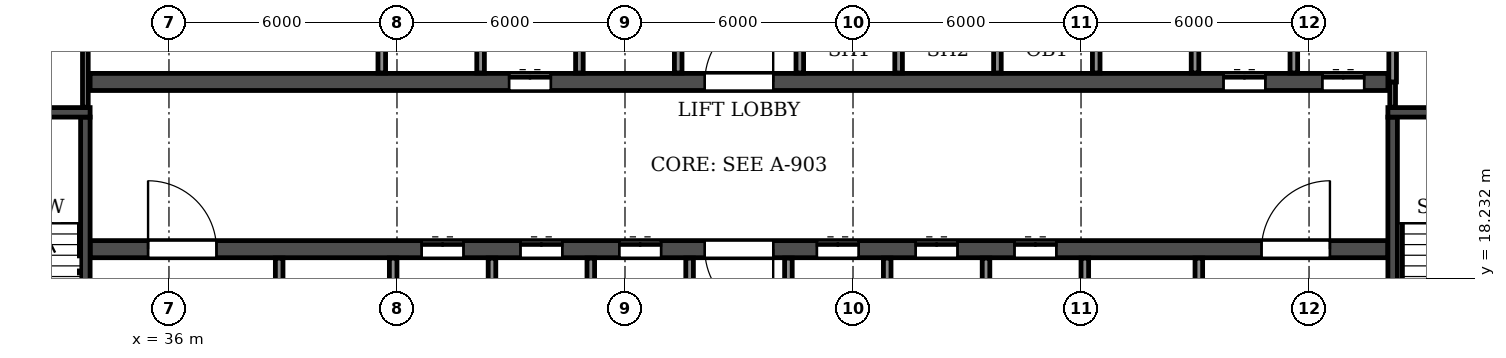
"""IFC4 building model, lengths in metres.
Left out: names, types, materials, properties, quantities, classifications, styles, units other than length and angle.
Written with IfcOpenShell. Run it as: python <this file> out.ifc"""

import sys

from ifc_helpers import new_model, si_unit, direction, frame, frame_2d, origin, place, context, subcontext, project, spatial, rectangle, extrude, element, fill, save


model = new_model("IFC4")
c1 = context("Model", 3, precision=1e-05, world=origin(), true_north=direction((0.0, 1.0)))
c2 = subcontext(c1, "Body", "Model", "MODEL_VIEW")
j1 = project(units=[si_unit("LENGTHUNIT", "METRE"), si_unit("PLANEANGLEUNIT", "RADIAN")], contexts=[c1])
p1 = place(None, origin())
s1 = spatial("IfcSite", under=j1, at=p1, CompositionType="ELEMENT")
p2 = place(p1, origin())
s2 = spatial("IfcBuilding", under=s1, at=p2, CompositionType="ELEMENT")
p3 = place(p2, frame((0.0, 0.0, 10.8)))
s3 = spatial("IfcBuildingStorey", under=s2, at=p3, CompositionType="ELEMENT", Elevation=10.8)
p4 = place(p3, frame((33.925, 19.0, 0.0), z_axis=(0.0, 0.0, 1.0), x_axis=(1.0, 0.0, 0.0)))
e1 = element("IfcWall", 1, at=p4, inside=s3, PredefinedType="SOLIDWALL", context=c2, shape_type="SweptSolid", body=[
    extrude(rectangle(XDim=34.15, YDim=0.45, at=frame_2d((17.075, 0.0))), origin(), (0.0, 0.0, 1.0), 3.92),
])
p5 = place(p4, frame((16.175, 0.0, 0.0)))
e2 = element("IfcOpeningElement", 2, at=p5, cuts=e1, PredefinedType="OPENING", context=c2, shape_type="SweptSolid", body=[
    extrude(rectangle(XDim=1.8, YDim=2.1, at=frame_2d((0.9, 1.05))), frame((0.0, 0.235, 0.0), z_axis=(0.0, -1.0, 0.0), x_axis=(1.0, 0.0, 0.0)), (0.0, 0.0, 1.0), 0.47),
])
p6 = place(p4, frame((1.525, 0.0, 0.0)))
e3 = element("IfcOpeningElement", 3, at=p6, cuts=e1, PredefinedType="OPENING", context=c2, shape_type="SweptSolid", body=[
    extrude(rectangle(XDim=1.8, YDim=2.1, at=frame_2d((0.9, 1.05))), frame((0.0, 0.235, 0.0), z_axis=(0.0, -1.0, 0.0), x_axis=(1.0, 0.0, 0.0)), (0.0, 0.0, 1.0), 0.47),
])
p7 = place(p4, frame((8.725, 0.0, 0.0)))
e4 = element("IfcOpeningElement", 4, at=p7, cuts=e1, PredefinedType="OPENING", context=c2, shape_type="SweptSolid", body=[
    extrude(rectangle(XDim=1.1, YDim=2.1, at=frame_2d((0.55, 1.05))), frame((0.0, 0.235, 0.0), z_axis=(0.0, -1.0, 0.0), x_axis=(1.0, 0.0, 0.0)), (0.0, 0.0, 1.0), 0.47),
])
p8 = place(p4, frame((11.325, 0.0, 0.0)))
e5 = element("IfcOpeningElement", 5, at=p8, cuts=e1, PredefinedType="OPENING", context=c2, shape_type="SweptSolid", body=[
    extrude(rectangle(XDim=1.1, YDim=2.1, at=frame_2d((0.55, 1.05))), frame((0.0, 0.235, 0.0), z_axis=(0.0, -1.0, 0.0), x_axis=(1.0, 0.0, 0.0)), (0.0, 0.0, 1.0), 0.47),
])
p9 = place(p4, frame((13.925, 0.0, 0.0)))
e6 = element("IfcOpeningElement", 6, at=p9, cuts=e1, PredefinedType="OPENING", context=c2, shape_type="SweptSolid", body=[
    extrude(rectangle(XDim=1.1, YDim=2.1, at=frame_2d((0.55, 1.05))), frame((0.0, 0.235, 0.0), z_axis=(0.0, -1.0, 0.0), x_axis=(1.0, 0.0, 0.0)), (0.0, 0.0, 1.0), 0.47),
])
p10 = place(p4, frame((19.125, 0.0, 0.0)))
e7 = element("IfcOpeningElement", 7, at=p10, cuts=e1, PredefinedType="OPENING", context=c2, shape_type="SweptSolid", body=[
    extrude(rectangle(XDim=1.1, YDim=2.1, at=frame_2d((0.55, 1.05))), frame((0.0, 0.235, 0.0), z_axis=(0.0, -1.0, 0.0), x_axis=(1.0, 0.0, 0.0)), (0.0, 0.0, 1.0), 0.47),
])
p11 = place(p4, frame((21.725, 0.0, 0.0)))
e8 = element("IfcOpeningElement", 8, at=p11, cuts=e1, PredefinedType="OPENING", context=c2, shape_type="SweptSolid", body=[
    extrude(rectangle(XDim=1.1, YDim=2.1, at=frame_2d((0.55, 1.05))), frame((0.0, 0.235, 0.0), z_axis=(0.0, -1.0, 0.0), x_axis=(1.0, 0.0, 0.0)), (0.0, 0.0, 1.0), 0.47),
])
p12 = place(p4, frame((24.325, 0.0, 0.0)))
e9 = element("IfcOpeningElement", 9, at=p12, cuts=e1, PredefinedType="OPENING", context=c2, shape_type="SweptSolid", body=[
    extrude(rectangle(XDim=1.1, YDim=2.1, at=frame_2d((0.55, 1.05))), frame((0.0, 0.235, 0.0), z_axis=(0.0, -1.0, 0.0), x_axis=(1.0, 0.0, 0.0)), (0.0, 0.0, 1.0), 0.47),
])
p13 = place(p4, frame((30.825, 0.0, 0.0)))
e10 = element("IfcOpeningElement", 10, at=p13, cuts=e1, PredefinedType="OPENING", context=c2, shape_type="SweptSolid", body=[
    extrude(rectangle(XDim=1.8, YDim=2.1, at=frame_2d((0.9, 1.05))), frame((0.0, 0.235, 0.0), z_axis=(0.0, -1.0, 0.0), x_axis=(1.0, 0.0, 0.0)), (0.0, 0.0, 1.0), 0.47),
])
p14 = place(p3, frame((33.925, 23.4, 0.0), z_axis=(0.0, 0.0, 1.0), x_axis=(1.0, 0.0, 0.0)))
e11 = element("IfcWall", 11, at=p14, inside=s3, PredefinedType="SOLIDWALL", context=c2, shape_type="SweptSolid", body=[
    extrude(rectangle(XDim=34.15, YDim=0.45, at=frame_2d((17.075, 0.0))), origin(), (0.0, 0.0, 1.0), 3.92),
])
p15 = place(p14, frame((16.175, 0.0, 0.0)))
e12 = element("IfcOpeningElement", 12, at=p15, cuts=e11, PredefinedType="OPENING", context=c2, shape_type="SweptSolid", body=[
    extrude(rectangle(XDim=1.8, YDim=2.1, at=frame_2d((0.9, 1.05))), frame((0.0, 0.235, 0.0), z_axis=(0.0, -1.0, 0.0), x_axis=(1.0, 0.0, 0.0)), (0.0, 0.0, 1.0), 0.47),
])
p16 = place(p14, frame((11.025, 0.0, 0.0)))
e13 = element("IfcOpeningElement", 13, at=p16, cuts=e11, PredefinedType="OPENING", context=c2, shape_type="SweptSolid", body=[
    extrude(rectangle(XDim=1.1, YDim=2.1, at=frame_2d((0.55, 1.05))), frame((0.0, 0.235, 0.0), z_axis=(0.0, -1.0, 0.0), x_axis=(1.0, 0.0, 0.0)), (0.0, 0.0, 1.0), 0.47),
])
p17 = place(p14, frame((29.825, 0.0, 0.0)))
e14 = element("IfcOpeningElement", 14, at=p17, cuts=e11, PredefinedType="OPENING", context=c2, shape_type="SweptSolid", body=[
    extrude(rectangle(XDim=1.1, YDim=2.1, at=frame_2d((0.55, 1.05))), frame((0.0, 0.235, 0.0), z_axis=(0.0, -1.0, 0.0), x_axis=(1.0, 0.0, 0.0)), (0.0, 0.0, 1.0), 0.47),
])
p18 = place(p14, frame((32.425, 0.0, 0.0)))
e15 = element("IfcOpeningElement", 15, at=p18, cuts=e11, PredefinedType="OPENING", context=c2, shape_type="SweptSolid", body=[
    extrude(rectangle(XDim=1.1, YDim=2.1, at=frame_2d((0.55, 1.05))), frame((0.0, 0.235, 0.0), z_axis=(0.0, -1.0, 0.0), x_axis=(1.0, 0.0, 0.0)), (0.0, 0.0, 1.0), 0.47),
])
p19 = place(p3, frame((33.8, 14.825, 0.0), z_axis=(0.0, 0.0, 1.0), x_axis=(0.0, 1.0, 0.0)))
e16 = element("IfcWall", 16, at=p19, inside=s3, PredefinedType="SOLIDWALL", context=c2, shape_type="SweptSolid", body=[
    extrude(rectangle(XDim=7.65, YDim=0.25, at=frame_2d((3.825, 0.0))), origin(), (0.0, 0.0, 1.0), 3.92),
])
p20 = place(p19, frame((0.475, 0.0, 0.0)))
e17 = element("IfcOpeningElement", 17, at=p20, cuts=e16, PredefinedType="OPENING", context=c2, shape_type="SweptSolid", body=[
    extrude(rectangle(XDim=1.0, YDim=2.1, at=frame_2d((0.5, 1.05))), frame((0.0, 0.135, 0.0), z_axis=(0.0, -1.0, 0.0), x_axis=(1.0, 0.0, 0.0)), (0.0, 0.0, 1.0), 0.27),
])
p21 = place(p3, frame((29.875, 22.6, 0.0), z_axis=(0.0, 0.0, 1.0), x_axis=(1.0, 0.0, 0.0)))
e18 = element("IfcWall", 18, at=p21, inside=s3, PredefinedType="SOLIDWALL", context=c2, shape_type="SweptSolid", body=[
    extrude(rectangle(XDim=4.05, YDim=0.25, at=frame_2d((2.025, 0.0))), origin(), (0.0, 0.0, 1.0), 3.92),
])
p22 = place(p3, frame((68.2, 14.825, 0.0), z_axis=(0.0, 0.0, 1.0), x_axis=(0.0, 1.0, 0.0)))
e19 = element("IfcWall", 19, at=p22, inside=s3, PredefinedType="SOLIDWALL", context=c2, shape_type="SweptSolid", body=[
    extrude(rectangle(XDim=7.65, YDim=0.25, at=frame_2d((3.825, 0.0))), origin(), (0.0, 0.0, 1.0), 3.92),
])
p23 = place(p22, frame((0.475, 0.0, 0.0)))
e20 = element("IfcOpeningElement", 20, at=p23, cuts=e19, PredefinedType="OPENING", context=c2, shape_type="SweptSolid", body=[
    extrude(rectangle(XDim=1.0, YDim=2.1, at=frame_2d((0.5, 1.05))), frame((0.0, 0.135, 0.0), z_axis=(0.0, -1.0, 0.0), x_axis=(1.0, 0.0, 0.0)), (0.0, 0.0, 1.0), 0.27),
])
p24 = place(p3, frame((68.075, 22.6, 0.0), z_axis=(0.0, 0.0, 1.0), x_axis=(1.0, 0.0, 0.0)))
e21 = element("IfcWall", 21, at=p24, inside=s3, PredefinedType="SOLIDWALL", context=c2, shape_type="SweptSolid", body=[
    extrude(rectangle(XDim=4.05, YDim=0.25, at=frame_2d((2.025, 0.0))), origin(), (0.0, 0.0, 1.0), 3.92),
])
for number, where, z_axis, x_axis in (
    (22, (41.6, 23.635, 0.0), (0.0, 0.0, 1.0), (0.0, 1.0, 0.0)),
    (23, (49.4, 23.635, 0.0), (0.0, 0.0, 1.0), (0.0, 1.0, 0.0)),
):
    element("IfcWall", number, at=place(p3, frame(where, z_axis=z_axis, x_axis=x_axis)), inside=s3, PredefinedType="PARTITIONING", context=c2, shape_type="SweptSolid", body=[
        extrude(rectangle(XDim=3.93, YDim=0.2, at=frame_2d((1.965, 0.0))), origin(), (0.0, 0.0, 1.0), 3.92),
    ])
p25 = place(p3, frame((33.8, 22.735, 0.0), z_axis=(0.0, 0.0, 1.0), x_axis=(0.0, 1.0, 0.0)))
e24 = element("IfcWall", 24, at=p25, inside=s3, PredefinedType="PARTITIONING", context=c2, shape_type="SweptSolid", body=[
    extrude(rectangle(XDim=4.83, YDim=0.15, at=frame_2d((2.415, 0.0))), origin(), (0.0, 0.0, 1.0), 3.92),
])
p26 = place(p3, frame((68.2, 22.735, 0.0), z_axis=(0.0, 0.0, 1.0), x_axis=(0.0, 1.0, 0.0)))
e25 = element("IfcWall", 25, at=p26, inside=s3, PredefinedType="PARTITIONING", context=c2, shape_type="SweptSolid", body=[
    extrude(rectangle(XDim=0.665, YDim=0.15, at=frame_2d((0.333, 0.0))), origin(), (0.0, 0.0, 1.0), 3.92),
])
p27 = place(p3, frame((38.9, 14.835, 0.0), z_axis=(0.0, 0.0, 1.0), x_axis=(0.0, 1.0, 0.0)))
e26 = element("IfcWall", 26, at=p27, inside=s3, PredefinedType="PARTITIONING", context=c2, shape_type="SweptSolid", body=[
    extrude(rectangle(XDim=3.93, YDim=0.2, at=frame_2d((1.965, 0.0))), origin(), (0.0, 0.0, 1.0), 3.92),
])
p28 = place(p27, frame((1.415, 0.0, 0.0)))
e27 = element("IfcOpeningElement", 27, at=p28, cuts=e26, PredefinedType="OPENING", context=c2, shape_type="SweptSolid", body=[
    extrude(rectangle(XDim=1.1, YDim=2.1, at=frame_2d((0.55, 1.05))), frame((0.0, 0.11, 0.0), z_axis=(0.0, -1.0, 0.0), x_axis=(1.0, 0.0, 0.0)), (0.0, 0.0, 1.0), 0.22),
])
for number, where, z_axis, x_axis in (
    (28, (41.9, 14.835, 0.0), (0.0, 0.0, 1.0), (0.0, 1.0, 0.0)),
    (29, (44.2, 23.635, 0.0), (0.0, 0.0, 1.0), (0.0, 1.0, 0.0)),
):
    element("IfcWall", number, at=place(p3, frame(where, z_axis=z_axis, x_axis=x_axis)), inside=s3, PredefinedType="PARTITIONING", context=c2, shape_type="SweptSolid", body=[
        extrude(rectangle(XDim=3.93, YDim=0.2, at=frame_2d((1.965, 0.0))), origin(), (0.0, 0.0, 1.0), 3.92),
    ])
p29 = place(p3, frame((44.5, 16.3, 0.0), z_axis=(0.0, 0.0, 1.0), x_axis=(0.0, 1.0, 0.0)))
e30 = element("IfcWall", 30, at=p29, inside=s3, PredefinedType="PARTITIONING", context=c2, shape_type="SweptSolid", body=[
    extrude(rectangle(XDim=2.465, YDim=0.2, at=frame_2d((1.232, 0.0))), origin(), (0.0, 0.0, 1.0), 3.92),
])
p30 = place(p3, frame((46.8, 23.635, 0.0), z_axis=(0.0, 0.0, 1.0), x_axis=(0.0, 1.0, 0.0)))
e31 = element("IfcWall", 31, at=p30, inside=s3, PredefinedType="PARTITIONING", context=c2, shape_type="SweptSolid", body=[
    extrude(rectangle(XDim=3.93, YDim=0.2, at=frame_2d((1.965, 0.0))), origin(), (0.0, 0.0, 1.0), 3.92),
])
for number, where, z_axis, x_axis in (
    (32, (47.1, 16.3, 0.0), (0.0, 0.0, 1.0), (0.0, 1.0, 0.0)),
    (33, (49.7, 16.3, 0.0), (0.0, 0.0, 1.0), (0.0, 1.0, 0.0)),
    (34, (52.3, 16.3, 0.0), (0.0, 0.0, 1.0), (0.0, 1.0, 0.0)),
):
    element("IfcWall", number, at=place(p3, frame(where, z_axis=z_axis, x_axis=x_axis)), inside=s3, PredefinedType="PARTITIONING", context=c2, shape_type="SweptSolid", body=[
        extrude(rectangle(XDim=2.465, YDim=0.2, at=frame_2d((1.232, 0.0))), origin(), (0.0, 0.0, 1.0), 3.92),
    ])
p31 = place(p3, frame((52.6, 23.635, 0.0), z_axis=(0.0, 0.0, 1.0), x_axis=(0.0, 1.0, 0.0)))
e35 = element("IfcWall", 35, at=p31, inside=s3, PredefinedType="PARTITIONING", context=c2, shape_type="SweptSolid", body=[
    extrude(rectangle(XDim=2.465, YDim=0.2, at=frame_2d((1.232, 0.0))), origin(), (0.0, 0.0, 1.0), 3.92),
])
p32 = place(p3, frame((54.9, 16.3, 0.0), z_axis=(0.0, 0.0, 1.0), x_axis=(0.0, 1.0, 0.0)))
e36 = element("IfcWall", 36, at=p32, inside=s3, PredefinedType="PARTITIONING", context=c2, shape_type="SweptSolid", body=[
    extrude(rectangle(XDim=2.465, YDim=0.2, at=frame_2d((1.232, 0.0))), origin(), (0.0, 0.0, 1.0), 3.92),
])
p33 = place(p3, frame((55.2, 23.635, 0.0), z_axis=(0.0, 0.0, 1.0), x_axis=(0.0, 1.0, 0.0)))
e37 = element("IfcWall", 37, at=p33, inside=s3, PredefinedType="PARTITIONING", context=c2, shape_type="SweptSolid", body=[
    extrude(rectangle(XDim=2.465, YDim=0.2, at=frame_2d((1.232, 0.0))), origin(), (0.0, 0.0, 1.0), 3.92),
])
p34 = place(p3, frame((57.5, 16.3, 0.0), z_axis=(0.0, 0.0, 1.0), x_axis=(0.0, 1.0, 0.0)))
e38 = element("IfcWall", 38, at=p34, inside=s3, PredefinedType="PARTITIONING", context=c2, shape_type="SweptSolid", body=[
    extrude(rectangle(XDim=2.465, YDim=0.2, at=frame_2d((1.232, 0.0))), origin(), (0.0, 0.0, 1.0), 3.92),
])
p35 = place(p3, frame((57.8, 23.635, 0.0), z_axis=(0.0, 0.0, 1.0), x_axis=(0.0, 1.0, 0.0)))
e39 = element("IfcWall", 39, at=p35, inside=s3, PredefinedType="PARTITIONING", context=c2, shape_type="SweptSolid", body=[
    extrude(rectangle(XDim=2.465, YDim=0.2, at=frame_2d((1.232, 0.0))), origin(), (0.0, 0.0, 1.0), 3.92),
])
p36 = place(p3, frame((60.1, 14.835, 0.0), z_axis=(0.0, 0.0, 1.0), x_axis=(0.0, 1.0, 0.0)))
e40 = element("IfcWall", 40, at=p36, inside=s3, PredefinedType="PARTITIONING", context=c2, shape_type="SweptSolid", body=[
    extrude(rectangle(XDim=3.93, YDim=0.2, at=frame_2d((1.965, 0.0))), origin(), (0.0, 0.0, 1.0), 3.92),
])
for number, where, z_axis, x_axis in (
    (41, (60.4, 23.635, 0.0), (0.0, 0.0, 1.0), (0.0, 1.0, 0.0)),
    (42, (63.0, 23.635, 0.0), (0.0, 0.0, 1.0), (0.0, 1.0, 0.0)),
):
    element("IfcWall", number, at=place(p3, frame(where, z_axis=z_axis, x_axis=x_axis)), inside=s3, PredefinedType="PARTITIONING", context=c2, shape_type="SweptSolid", body=[
        extrude(rectangle(XDim=2.465, YDim=0.2, at=frame_2d((1.232, 0.0))), origin(), (0.0, 0.0, 1.0), 3.92),
    ])
p37 = place(p3, frame((63.1, 14.835, 0.0), z_axis=(0.0, 0.0, 1.0), x_axis=(0.0, 1.0, 0.0)))
e43 = element("IfcWall", 43, at=p37, inside=s3, PredefinedType="PARTITIONING", context=c2, shape_type="SweptSolid", body=[
    extrude(rectangle(XDim=3.93, YDim=0.2, at=frame_2d((1.965, 0.0))), origin(), (0.0, 0.0, 1.0), 3.92),
])
p38 = place(p37, frame((1.415, 0.0, 0.0)))
e44 = element("IfcOpeningElement", 44, at=p38, cuts=e43, PredefinedType="OPENING", context=c2, shape_type="SweptSolid", body=[
    extrude(rectangle(XDim=1.1, YDim=2.1, at=frame_2d((0.55, 1.05))), frame((0.0, 0.11, 0.0), z_axis=(0.0, -1.0, 0.0), x_axis=(1.0, 0.0, 0.0)), (0.0, 0.0, 1.0), 0.22),
])
p39 = place(p3, frame((65.6, 23.635, 0.0), z_axis=(0.0, 0.0, 1.0), x_axis=(0.0, 1.0, 0.0)))
e45 = element("IfcWall", 45, at=p39, inside=s3, PredefinedType="PARTITIONING", context=c2, shape_type="SweptSolid", body=[
    extrude(rectangle(XDim=2.465, YDim=0.2, at=frame_2d((1.232, 0.0))), origin(), (0.0, 0.0, 1.0), 3.92),
])
p40 = place(p3, frame((68.2, 23.4, 0.0), z_axis=(0.0, 0.0, 1.0), x_axis=(0.0, 1.0, 0.0)))
e46 = element("IfcWall", 46, at=p40, inside=s3, PredefinedType="PARTITIONING", context=c2, shape_type="SweptSolid", body=[
    extrude(rectangle(XDim=2.7, YDim=0.2, at=frame_2d((1.35, 0.0))), origin(), (0.0, 0.0, 1.0), 3.92),
])
p41 = place(p15, origin())
e47 = element("IfcDoor", 47, at=p41, inside=s3, OperationType="DOUBLE_DOOR_SINGLE_SWING", PredefinedType="DOOR", context=c2, shape_type="SweptSolid", body=[
    extrude(rectangle(XDim=1.8, YDim=2.1, at=frame_2d((0.9, 1.05))), frame((0.0, 0.025, 0.0), z_axis=(0.0, -1.0, 0.0), x_axis=(1.0, 0.0, 0.0)), (0.0, 0.0, 1.0), 0.05),
])
fill(e12, e47)
p42 = place(p5, frame((1.8, 0.0, 0.0), z_axis=(0.0, 0.0, 1.0), x_axis=(-1.0, 0.0, 0.0)))
e48 = element("IfcDoor", 48, at=p42, inside=s3, OperationType="DOUBLE_DOOR_SINGLE_SWING", PredefinedType="DOOR", context=c2, shape_type="SweptSolid", body=[
    extrude(rectangle(XDim=1.8, YDim=2.1, at=frame_2d((0.9, 1.05))), frame((0.0, 0.025, 0.0), z_axis=(0.0, -1.0, 0.0), x_axis=(1.0, 0.0, 0.0)), (0.0, 0.0, 1.0), 0.05),
])
fill(e2, e48)
p43 = place(p6, origin())
e49 = element("IfcDoor", 49, at=p43, inside=s3, OperationType="DOUBLE_DOOR_SINGLE_SWING", PredefinedType="DOOR", context=c2, shape_type="SweptSolid", body=[
    extrude(rectangle(XDim=1.8, YDim=2.1, at=frame_2d((0.9, 1.05))), frame((0.0, 0.025, 0.0), z_axis=(0.0, -1.0, 0.0), x_axis=(1.0, 0.0, 0.0)), (0.0, 0.0, 1.0), 0.05),
])
fill(e3, e49)
p44 = place(p7, origin())
e50 = element("IfcDoor", 50, at=p44, inside=s3, OperationType="DOUBLE_DOOR_SLIDING", PredefinedType="DOOR", context=c2, shape_type="SweptSolid", body=[
    extrude(rectangle(XDim=1.1, YDim=2.1, at=frame_2d((0.55, 1.05))), frame((0.0, 0.025, 0.0), z_axis=(0.0, -1.0, 0.0), x_axis=(1.0, 0.0, 0.0)), (0.0, 0.0, 1.0), 0.05),
])
fill(e4, e50)
p45 = place(p16, origin())
e51 = element("IfcDoor", 51, at=p45, inside=s3, OperationType="DOUBLE_DOOR_SLIDING", PredefinedType="DOOR", context=c2, shape_type="SweptSolid", body=[
    extrude(rectangle(XDim=1.1, YDim=2.1, at=frame_2d((0.55, 1.05))), frame((0.0, 0.025, 0.0), z_axis=(0.0, -1.0, 0.0), x_axis=(1.0, 0.0, 0.0)), (0.0, 0.0, 1.0), 0.05),
])
fill(e13, e51)
p46 = place(p8, origin())
e52 = element("IfcDoor", 52, at=p46, inside=s3, OperationType="DOUBLE_DOOR_SLIDING", PredefinedType="DOOR", context=c2, shape_type="SweptSolid", body=[
    extrude(rectangle(XDim=1.1, YDim=2.1, at=frame_2d((0.55, 1.05))), frame((0.0, 0.025, 0.0), z_axis=(0.0, -1.0, 0.0), x_axis=(1.0, 0.0, 0.0)), (0.0, 0.0, 1.0), 0.05),
])
fill(e5, e52)
p47 = place(p9, origin())
e53 = element("IfcDoor", 53, at=p47, inside=s3, OperationType="DOUBLE_DOOR_SLIDING", PredefinedType="DOOR", context=c2, shape_type="SweptSolid", body=[
    extrude(rectangle(XDim=1.1, YDim=2.1, at=frame_2d((0.55, 1.05))), frame((0.0, 0.025, 0.0), z_axis=(0.0, -1.0, 0.0), x_axis=(1.0, 0.0, 0.0)), (0.0, 0.0, 1.0), 0.05),
])
fill(e6, e53)
p48 = place(p10, origin())
e54 = element("IfcDoor", 54, at=p48, inside=s3, OperationType="DOUBLE_DOOR_SLIDING", PredefinedType="DOOR", context=c2, shape_type="SweptSolid", body=[
    extrude(rectangle(XDim=1.1, YDim=2.1, at=frame_2d((0.55, 1.05))), frame((0.0, 0.025, 0.0), z_axis=(0.0, -1.0, 0.0), x_axis=(1.0, 0.0, 0.0)), (0.0, 0.0, 1.0), 0.05),
])
fill(e7, e54)
p49 = place(p11, origin())
e55 = element("IfcDoor", 55, at=p49, inside=s3, OperationType="DOUBLE_DOOR_SLIDING", PredefinedType="DOOR", context=c2, shape_type="SweptSolid", body=[
    extrude(rectangle(XDim=1.1, YDim=2.1, at=frame_2d((0.55, 1.05))), frame((0.0, 0.025, 0.0), z_axis=(0.0, -1.0, 0.0), x_axis=(1.0, 0.0, 0.0)), (0.0, 0.0, 1.0), 0.05),
])
fill(e8, e55)
p50 = place(p12, origin())
e56 = element("IfcDoor", 56, at=p50, inside=s3, OperationType="DOUBLE_DOOR_SLIDING", PredefinedType="DOOR", context=c2, shape_type="SweptSolid", body=[
    extrude(rectangle(XDim=1.1, YDim=2.1, at=frame_2d((0.55, 1.05))), frame((0.0, 0.025, 0.0), z_axis=(0.0, -1.0, 0.0), x_axis=(1.0, 0.0, 0.0)), (0.0, 0.0, 1.0), 0.05),
])
fill(e9, e56)
p51 = place(p17, origin())
e57 = element("IfcDoor", 57, at=p51, inside=s3, OperationType="DOUBLE_DOOR_SLIDING", PredefinedType="DOOR", context=c2, shape_type="SweptSolid", body=[
    extrude(rectangle(XDim=1.1, YDim=2.1, at=frame_2d((0.55, 1.05))), frame((0.0, 0.025, 0.0), z_axis=(0.0, -1.0, 0.0), x_axis=(1.0, 0.0, 0.0)), (0.0, 0.0, 1.0), 0.05),
])
fill(e14, e57)
p52 = place(p13, origin())
e58 = element("IfcDoor", 58, at=p52, inside=s3, OperationType="DOUBLE_DOOR_SINGLE_SWING", PredefinedType="DOOR", context=c2, shape_type="SweptSolid", body=[
    extrude(rectangle(XDim=1.8, YDim=2.1, at=frame_2d((0.9, 1.05))), frame((0.0, 0.025, 0.0), z_axis=(0.0, -1.0, 0.0), x_axis=(1.0, 0.0, 0.0)), (0.0, 0.0, 1.0), 0.05),
])
fill(e10, e58)
p53 = place(p18, origin())
e59 = element("IfcDoor", 59, at=p53, inside=s3, OperationType="DOUBLE_DOOR_SLIDING", PredefinedType="DOOR", context=c2, shape_type="SweptSolid", body=[
    extrude(rectangle(XDim=1.1, YDim=2.1, at=frame_2d((0.55, 1.05))), frame((0.0, 0.025, 0.0), z_axis=(0.0, -1.0, 0.0), x_axis=(1.0, 0.0, 0.0)), (0.0, 0.0, 1.0), 0.05),
])
fill(e15, e59)
save(model, sys.argv[1])
